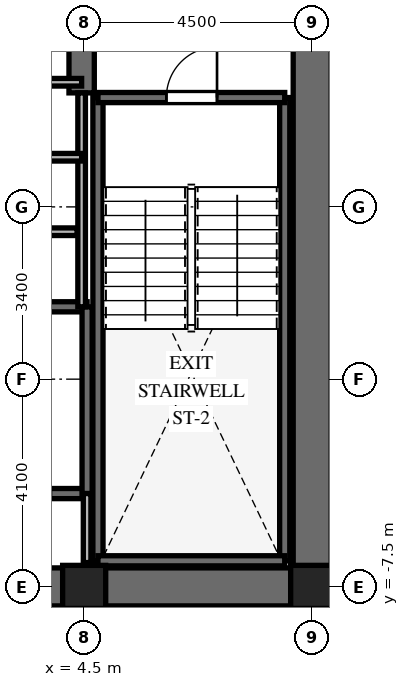
"""IFC4 building model, lengths in metres.
Left out: names, types, materials, properties, quantities, classifications, styles, units other than length and angle.
Written with IfcOpenShell. Run it as: python <this file> out.ifc"""

import sys

from ifc_helpers import new_model, si_unit, direction, frame, frame_2d, origin, origin_2d, place, context, subcontext, project, spatial, rectangle, extrude, element, fill, save


model = new_model("IFC4")
c1 = context("Model", 3, precision=1e-05, world=origin(), true_north=direction((0.0, 1.0)))
c2 = subcontext(c1, "Body", "Model", "MODEL_VIEW")
j1 = project(units=[si_unit("LENGTHUNIT", "METRE"), si_unit("PLANEANGLEUNIT", "RADIAN")], contexts=[c1])
p1 = place(None, origin())
s1 = spatial("IfcSite", under=j1, at=p1, CompositionType="ELEMENT")
p2 = place(p1, origin())
s2 = spatial("IfcBuilding", under=s1, at=p2, CompositionType="ELEMENT")
p3 = place(p2, frame((0.0, 0.0, 206.5)))
s3 = spatial("IfcBuildingStorey", under=s2, at=p3, CompositionType="ELEMENT", Elevation=206.5)
p4 = place(p3, frame((-9.375, -7.5, 0.0), z_axis=(0.0, 0.0, 1.0), x_axis=(1.0, 0.0, 0.0)))
e1 = element("IfcWall", 1, at=p4, inside=s3, PredefinedType="SHEAR", context=c2, shape_type="SweptSolid", body=[
    extrude(rectangle(XDim=18.75, YDim=0.75, at=frame_2d((9.375, 0.0))), origin(), (0.0, 0.0, 1.0), 3.8),
])
p5 = place(p4, frame((9.425, 0.0, 0.0)))
e2 = element("IfcOpeningElement", 2, at=p5, cuts=e1, PredefinedType="OPENING", context=c2, shape_type="SweptSolid", body=[
    extrude(rectangle(XDim=1.0, YDim=2.15, at=frame_2d((0.5, 1.075))), frame((0.0, 0.385, 0.0), z_axis=(0.0, -1.0, 0.0), x_axis=(1.0, 0.0, 0.0)), (0.0, 0.0, 1.0), 0.77),
])
p6 = place(p3, frame((9.0, -7.125, 0.0), z_axis=(0.0, 0.0, 1.0), x_axis=(0.0, 1.0, 0.0)))
e3 = element("IfcWall", 3, at=p6, inside=s3, PredefinedType="SHEAR", context=c2, shape_type="SweptSolid", body=[
    extrude(rectangle(XDim=14.25, YDim=0.75, at=frame_2d((7.125, 0.0))), origin(), (0.0, 0.0, 1.0), 3.8),
])
p7 = place(p6, frame((10.25, 0.0, 0.0)))
e4 = element("IfcOpeningElement", 4, at=p7, cuts=e3, PredefinedType="OPENING", context=c2, shape_type="SweptSolid", body=[
    extrude(rectangle(XDim=1.05, YDim=2.15, at=frame_2d((0.525, 1.075))), frame((0.0, 0.385, 0.0), z_axis=(0.0, -1.0, 0.0), x_axis=(1.0, 0.0, 0.0)), (0.0, 0.0, 1.0), 0.77),
])
p8 = place(p3, frame((4.45, 2.25, 0.0), z_axis=(0.0, 0.0, 1.0), x_axis=(0.0, 1.0, 0.0)))
e5 = element("IfcWall", 5, at=p8, inside=s3, PredefinedType="SHEAR", context=c2, shape_type="SweptSolid", body=[
    extrude(rectangle(XDim=4.875, YDim=0.5, at=frame_2d((2.438, 0.0))), origin(), (0.0, 0.0, 1.0), 3.8),
])
for number, where, z_axis, x_axis in (
    (6, (4.772, -6.985, 0.0), (0.0, 0.0, 1.0), (0.0, 1.0, 0.0)),
    (7, (8.458, -6.985, 0.0), (0.0, 0.0, 1.0), (0.0, 1.0, 0.0)),
):
    element("IfcWall", number, at=place(p3, frame(where, z_axis=z_axis, x_axis=x_axis)), inside=s3, PredefinedType="SHEAR", context=c2, shape_type="SweptSolid", body=[
        extrude(rectangle(XDim=9.143, YDim=0.2, at=frame_2d((4.572, 0.0))), origin(), (0.0, 0.0, 1.0), 3.8),
    ])
p9 = place(p3, frame((4.772, -6.985, 0.0), z_axis=(0.0, 0.0, 1.0), x_axis=(1.0, 0.0, 0.0)))
e8 = element("IfcWall", 8, at=p9, inside=s3, PredefinedType="SHEAR", context=c2, shape_type="SweptSolid", body=[
    extrude(rectangle(XDim=3.686, YDim=0.2, at=frame_2d((1.843, 0.0))), origin(), (0.0, 0.0, 1.0), 3.8),
])
p10 = place(p3, frame((4.772, 2.158, 0.0), z_axis=(0.0, 0.0, 1.0), x_axis=(1.0, 0.0, 0.0)))
e9 = element("IfcWall", 9, at=p10, inside=s3, PredefinedType="SHEAR", context=c2, shape_type="SweptSolid", body=[
    extrude(rectangle(XDim=3.686, YDim=0.2, at=frame_2d((1.843, 0.0))), origin(), (0.0, 0.0, 1.0), 3.8),
])
p11 = place(p10, frame((1.35, 0.0, 0.0)))
e10 = element("IfcOpeningElement", 10, at=p11, cuts=e9, PredefinedType="OPENING", context=c2, shape_type="SweptSolid", body=[
    extrude(rectangle(XDim=1.0, YDim=2.15, at=frame_2d((0.5, 1.075))), frame((0.0, 0.11, 0.0), z_axis=(0.0, -1.0, 0.0), x_axis=(1.0, 0.0, 0.0)), (0.0, 0.0, 1.0), 0.22),
])
p12 = place(p3, frame((-4.608, -5.658, 0.0), z_axis=(0.0, 0.0, 1.0), x_axis=(1.0, 0.0, 0.0)))
e11 = element("IfcWall", 11, at=p12, inside=s3, PredefinedType="SHEAR", context=c2, shape_type="SweptSolid", body=[
    extrude(rectangle(XDim=9.166, YDim=0.2, at=frame_2d((4.583, 0.0))), origin(), (0.0, 0.0, 1.0), 3.8),
])
p13 = place(p12, frame((7.45, 0.0, 0.0)))
e12 = element("IfcOpeningElement", 12, at=p13, cuts=e11, PredefinedType="OPENING", context=c2, shape_type="SweptSolid", body=[
    extrude(rectangle(XDim=1.0, YDim=2.15, at=frame_2d((0.5, 1.075))), frame((0.0, 0.11, 0.0), z_axis=(0.0, -1.0, 0.0), x_axis=(1.0, 0.0, 0.0)), (0.0, 0.0, 1.0), 0.22),
])
p14 = place(p3, frame((-4.608, -1.972, 0.0), z_axis=(0.0, 0.0, 1.0), x_axis=(1.0, 0.0, 0.0)))
e13 = element("IfcWall", 13, at=p14, inside=s3, PredefinedType="SHEAR", context=c2, shape_type="SweptSolid", body=[
    extrude(rectangle(XDim=9.166, YDim=0.2, at=frame_2d((4.583, 0.0))), origin(), (0.0, 0.0, 1.0), 3.8),
])
p15 = place(p3, frame((4.558, -5.658, 0.0), z_axis=(0.0, 0.0, 1.0), x_axis=(0.0, 1.0, 0.0)))
e14 = element("IfcWall", 14, at=p15, inside=s3, PredefinedType="SHEAR", context=c2, shape_type="SweptSolid", body=[
    extrude(rectangle(XDim=3.686, YDim=0.2, at=frame_2d((1.843, 0.0))), origin(), (0.0, 0.0, 1.0), 3.8),
])
for number, where, z_axis, x_axis in (
    (15, (4.5, -7.5, 0.0), (0.0, 0.0, 1.0), (1.0, 0.0, 0.0)),
    (16, (9.0, -7.5, 0.0), (0.0, 0.0, 1.0), (1.0, 0.0, 0.0)),
):
    element("IfcColumn", number, at=place(p3, frame(where, z_axis=z_axis, x_axis=x_axis)), inside=s3, PredefinedType="COLUMN", context=c2, shape_type="SweptSolid", body=[
        extrude(rectangle(XDim=0.85, YDim=0.85, at=origin_2d()), origin(), (0.0, 0.0, 1.0), 3.8),
    ])
p16 = place(p3, frame((4.558, -7.02, 0.0), z_axis=(0.0, 0.0, 1.0), x_axis=(0.0, 1.0, 0.0)))
e17 = element("IfcWall", 17, at=p16, inside=s3, PredefinedType="PARTITIONING", context=c2, shape_type="SweptSolid", body=[
    extrude(rectangle(XDim=1.362, YDim=0.15, at=frame_2d((0.681, 0.0))), origin(), (0.0, 0.0, 1.0), 3.5),
])
p17 = place(p3, frame((4.45, -1.972, 0.0), z_axis=(0.0, 0.0, 1.0), x_axis=(0.0, 1.0, 0.0)))
e18 = element("IfcWall", 18, at=p17, inside=s3, PredefinedType="PARTITIONING", context=c2, shape_type="SweptSolid", body=[
    extrude(rectangle(XDim=4.222, YDim=0.15, at=frame_2d((2.111, 0.0))), origin(), (0.0, 0.0, 1.0), 3.5),
])
for number, where, z_axis, x_axis in (
    (19, (1.9, 0.98, 0.0), (0.0, 0.0, 1.0), (1.0, 0.0, 0.0)),
    (20, (1.9, 2.46, 0.0), (0.0, 0.0, 1.0), (1.0, 0.0, 0.0)),
):
    element("IfcWall", number, at=place(p3, frame(where, z_axis=z_axis, x_axis=x_axis)), inside=s3, PredefinedType="PARTITIONING", context=c2, shape_type="SweptSolid", body=[
        extrude(rectangle(XDim=2.55, YDim=0.15, at=frame_2d((1.275, 0.0))), origin(), (0.0, 0.0, 1.0), 3.5),
    ])
p18 = place(p3, frame((-4.36, -0.49, 0.0), z_axis=(0.0, 0.0, 1.0), x_axis=(1.0, 0.0, 0.0)))
e21 = element("IfcWall", 21, at=p18, inside=s3, PredefinedType="PARTITIONING", context=c2, shape_type="SweptSolid", body=[
    extrude(rectangle(XDim=8.72, YDim=0.15, at=frame_2d((4.36, 0.0))), origin(), (0.0, 0.0, 1.0), 3.5),
])
p19 = place(p18, frame((3.86, 0.0, 0.0)))
e22 = element("IfcOpeningElement", 22, at=p19, cuts=e21, PredefinedType="OPENING", context=c2, shape_type="SweptSolid", body=[
    extrude(rectangle(XDim=0.9, YDim=2.03, at=frame_2d((0.45, 1.015))), frame((0.0, 0.085, 0.0), z_axis=(0.0, -1.0, 0.0), x_axis=(1.0, 0.0, 0.0)), (0.0, 0.0, 1.0), 0.17),
])
p20 = place(p11, origin())
e23 = element("IfcDoor", 23, at=p20, inside=s3, OperationType="SINGLE_SWING_RIGHT", PredefinedType="DOOR", context=c2, shape_type="SweptSolid", body=[
    extrude(rectangle(XDim=1.0, YDim=2.15, at=frame_2d((0.5, 1.075))), frame((0.0, 0.025, 0.0), z_axis=(0.0, -1.0, 0.0), x_axis=(1.0, 0.0, 0.0)), (0.0, 0.0, 1.0), 0.05),
])
fill(e10, e23)
save(model, sys.argv[1])
